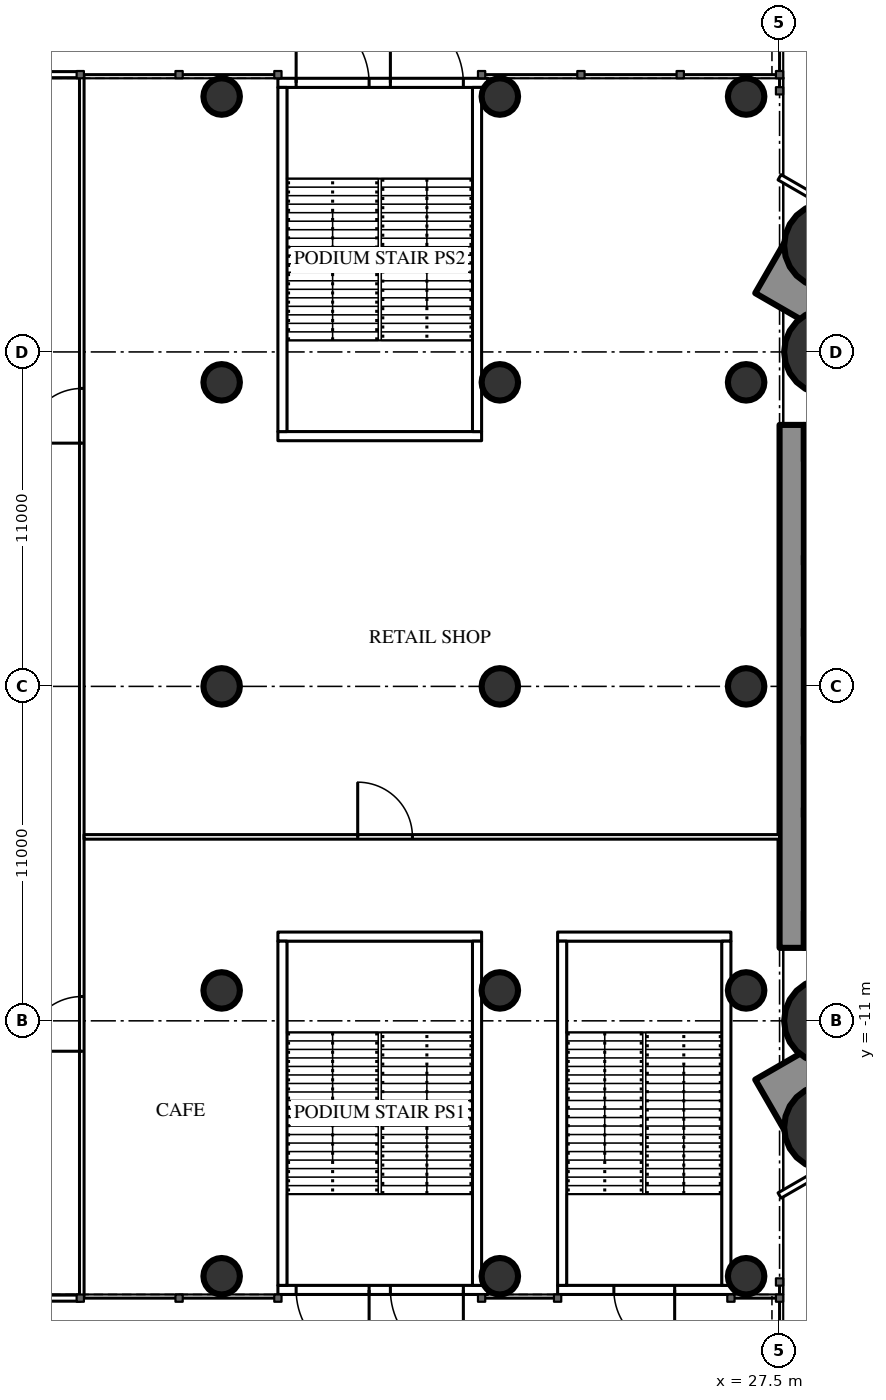
"""IFC4 building model, lengths in metres.
Left out: names, types, materials, properties, quantities, classifications, styles, units other than length and angle.
Written with IfcOpenShell. Run it as: python <this file> out.ifc"""

import sys

from ifc_helpers import new_model, si_unit, direction, frame, frame_2d, origin, origin_2d, place, context, subcontext, project, spatial, rectangle, circle, hollow_circle, extrude, element, fill, save


model = new_model("IFC4")
c1 = context("Model", 3, precision=1e-05, world=origin(), true_north=direction((0.0, 1.0)))
c2 = subcontext(c1, "Body", "Model", "MODEL_VIEW")
j1 = project(units=[si_unit("LENGTHUNIT", "METRE"), si_unit("PLANEANGLEUNIT", "RADIAN")], contexts=[c1])
p1 = place(None, origin())
s1 = spatial("IfcSite", under=j1, at=p1, CompositionType="ELEMENT")
p2 = place(p1, origin())
s2 = spatial("IfcBuilding", under=s1, at=p2, CompositionType="ELEMENT")
p3 = place(p2, origin())
s3 = spatial("IfcBuildingStorey", under=s2, at=p3, CompositionType="ELEMENT", Elevation=0.0)
for number, where, z_axis, x_axis in (
    (1, (29.05, 11.0, 0.0), (0.0, 0.0, 1.0), (1.0, 0.0, 0.0)),
    (2, (29.05, -11.0, 0.0), (0.0, 0.0, 1.0), (1.0, 0.0, 0.0)),
    (3, (29.05, -14.5, 0.0), (0.0, 0.0, 1.0), (1.0, 0.0, 0.0)),
    (4, (29.05, 14.5, 0.0), (0.0, 0.0, 1.0), (1.0, 0.0, 0.0)),
):
    element("IfcColumn", number, at=place(p3, frame(where, z_axis=z_axis, x_axis=x_axis)), inside=s3, PredefinedType="COLUMN", context=c2, shape_type="SweptSolid", body=[
        extrude(hollow_circle(Radius=1.4, WallThickness=0.12, at=origin_2d()), origin(), (0.0, 0.0, 1.0), 7.2),
    ])
p4 = place(p3, frame((27.9, -8.6, 0.0), z_axis=(0.0, 0.0, 1.0), x_axis=(0.0, 1.0, 0.0)))
e5 = element("IfcWall", 5, at=p4, inside=s3, PredefinedType="SHEAR", context=c2, shape_type="SweptSolid", body=[
    extrude(rectangle(XDim=17.2, YDim=0.8, at=frame_2d((8.6, 0.0))), origin(), (0.0, 0.0, 1.0), 7.2),
])
p5 = place(p3, frame((28.3, -8.0, 0.0), z_axis=(0.0, 0.0, 1.0), x_axis=(1.0, 0.0, 0.0)))
e6 = element("IfcWall", 6, at=p5, inside=s3, PredefinedType="SHEAR", context=c2, shape_type="SweptSolid", body=[
    extrude(rectangle(XDim=8.4, YDim=1.2, at=frame_2d((4.2, 0.0))), origin(), (0.0, 0.0, 1.0), 7.2),
])
p6 = place(p5, frame((0.25, 0.0, 0.0)))
e7 = element("IfcOpeningElement", 7, at=p6, cuts=e6, PredefinedType="OPENING", context=c2, shape_type="SweptSolid", body=[
    extrude(rectangle(XDim=1.0, YDim=2.2, at=frame_2d((0.5, 1.1))), frame((0.0, 0.61, 0.0), z_axis=(0.0, -1.0, 0.0), x_axis=(1.0, 0.0, 0.0)), (0.0, 0.0, 1.0), 1.22),
])
p7 = place(p3, frame((28.3, 8.0, 0.0), z_axis=(0.0, 0.0, 1.0), x_axis=(1.0, 0.0, 0.0)))
e8 = element("IfcWall", 8, at=p7, inside=s3, PredefinedType="SHEAR", context=c2, shape_type="SweptSolid", body=[
    extrude(rectangle(XDim=8.4, YDim=1.2, at=frame_2d((4.2, 0.0))), origin(), (0.0, 0.0, 1.0), 7.2),
])
p8 = place(p7, frame((0.25, 0.0, 0.0)))
e9 = element("IfcOpeningElement", 9, at=p8, cuts=e8, PredefinedType="OPENING", context=c2, shape_type="SweptSolid", body=[
    extrude(rectangle(XDim=1.0, YDim=2.2, at=frame_2d((0.5, 1.1))), frame((0.0, 0.61, 0.0), z_axis=(0.0, -1.0, 0.0), x_axis=(1.0, 0.0, 0.0)), (0.0, 0.0, 1.0), 1.22),
])
for number, where, z_axis, x_axis in (
    (10, (28.3, -4.15, 0.0), (0.0, 0.0, 1.0), (1.0, 0.0, 0.0)),
    (11, (28.3, 4.15, 0.0), (0.0, 0.0, 1.0), (1.0, 0.0, 0.0)),
):
    element("IfcWall", number, at=place(p3, frame(where, z_axis=z_axis, x_axis=x_axis)), inside=s3, PredefinedType="SHEAR", context=c2, shape_type="SweptSolid", body=[
        extrude(rectangle(XDim=8.4, YDim=0.3, at=frame_2d((4.2, 0.0))), origin(), (0.0, 0.0, 1.0), 7.2),
    ])
for number, where, z_axis, x_axis in (
    (12, (28.3, -1.775, 0.0), (0.0, 0.0, 1.0), (1.0, 0.0, 0.0)),
    (13, (28.3, 1.775, 0.0), (0.0, 0.0, 1.0), (1.0, 0.0, 0.0)),
):
    element("IfcWall", number, at=place(p3, frame(where, z_axis=z_axis, x_axis=x_axis)), inside=s3, PredefinedType="SHEAR", context=c2, shape_type="SweptSolid", body=[
        extrude(rectangle(XDim=2.9, YDim=0.25, at=frame_2d((1.45, 0.0))), origin(), (0.0, 0.0, 1.0), 7.2),
    ])
p9 = place(p3, frame((27.2, -13.8, 0.0), z_axis=(0.0, 0.0, 1.0), x_axis=(0.866027159892, 0.499996958321, 0.0)))
e14 = element("IfcWall", 14, at=p9, inside=s3, PredefinedType="SHEAR", context=c2, shape_type="SweptSolid", body=[
    extrude(rectangle(XDim=27.947, YDim=2.0, at=frame_2d((13.973, 0.0))), origin(), (0.0, 0.0, 1.0), 7.2),
])
p10 = place(p9, frame((4.6, 0.0, 0.0)))
e15 = element("IfcOpeningElement", 15, at=p10, cuts=e14, PredefinedType="OPENING", context=c2, shape_type="SweptSolid", body=[
    extrude(rectangle(XDim=1.0, YDim=2.2, at=frame_2d((0.5, 1.1))), frame((0.0, 1.01, 0.0), z_axis=(0.0, -1.0, 0.0), x_axis=(1.0, 0.0, 0.0)), (0.0, 0.0, 1.0), 2.02),
])
p11 = place(p9, frame((13.395, 0.0, 0.0)))
e16 = element("IfcOpeningElement", 16, at=p11, cuts=e14, PredefinedType="OPENING", context=c2, shape_type="SweptSolid", body=[
    extrude(rectangle(XDim=1.8, YDim=2.2, at=frame_2d((0.9, 1.1))), frame((0.0, 1.01, 0.0), z_axis=(0.0, -1.0, 0.0), x_axis=(1.0, 0.0, 0.0)), (0.0, 0.0, 1.0), 2.02),
])
p12 = place(p3, frame((27.2, 13.8, 0.0), z_axis=(0.0, 0.0, 1.0), x_axis=(0.866024545924, -0.500001485854, 0.0)))
e17 = element("IfcWall", 17, at=p12, inside=s3, PredefinedType="SHEAR", context=c2, shape_type="SweptSolid", body=[
    extrude(rectangle(XDim=26.534, YDim=2.0, at=frame_2d((13.267, 0.0))), origin(), (0.0, 0.0, 1.0), 7.2),
])
p13 = place(p12, frame((4.6, 0.0, 0.0)))
e18 = element("IfcOpeningElement", 18, at=p13, cuts=e17, PredefinedType="OPENING", context=c2, shape_type="SweptSolid", body=[
    extrude(rectangle(XDim=1.0, YDim=2.2, at=frame_2d((0.5, 1.1))), frame((0.0, 1.01, 0.0), z_axis=(0.0, -1.0, 0.0), x_axis=(1.0, 0.0, 0.0)), (0.0, 0.0, 1.0), 2.02),
])
p14 = place(p12, frame((13.395, 0.0, 0.0)))
e19 = element("IfcOpeningElement", 19, at=p14, cuts=e17, PredefinedType="OPENING", context=c2, shape_type="SweptSolid", body=[
    extrude(rectangle(XDim=1.8, YDim=2.2, at=frame_2d((0.9, 1.1))), frame((0.0, 1.01, 0.0), z_axis=(0.0, -1.0, 0.0), x_axis=(1.0, 0.0, 0.0)), (0.0, 0.0, 1.0), 2.02),
])
for number, where, z_axis, x_axis in (
    (20, (9.15, -19.4, 0.0), (0.0, 0.0, 1.0), (1.0, 0.0, 0.0)),
    (21, (9.15, -10.0, 0.0), (0.0, 0.0, 1.0), (1.0, 0.0, 0.0)),
    (22, (9.15, 0.0, 0.0), (0.0, 0.0, 1.0), (1.0, 0.0, 0.0)),
    (23, (9.15, 10.0, 0.0), (0.0, 0.0, 1.0), (1.0, 0.0, 0.0)),
    (24, (9.15, 19.4, 0.0), (0.0, 0.0, 1.0), (1.0, 0.0, 0.0)),
    (25, (18.3, -19.4, 0.0), (0.0, 0.0, 1.0), (1.0, 0.0, 0.0)),
    (26, (18.3, -10.0, 0.0), (0.0, 0.0, 1.0), (1.0, 0.0, 0.0)),
    (27, (18.3, 0.0, 0.0), (0.0, 0.0, 1.0), (1.0, 0.0, 0.0)),
    (28, (18.3, 10.0, 0.0), (0.0, 0.0, 1.0), (1.0, 0.0, 0.0)),
    (29, (18.3, 19.4, 0.0), (0.0, 0.0, 1.0), (1.0, 0.0, 0.0)),
    (30, (26.4, -19.4, 0.0), (0.0, 0.0, 1.0), (1.0, 0.0, 0.0)),
    (31, (26.4, -10.0, 0.0), (0.0, 0.0, 1.0), (1.0, 0.0, 0.0)),
    (32, (26.4, 0.0, 0.0), (0.0, 0.0, 1.0), (1.0, 0.0, 0.0)),
    (33, (26.4, 10.0, 0.0), (0.0, 0.0, 1.0), (1.0, 0.0, 0.0)),
    (34, (26.4, 19.4, 0.0), (0.0, 0.0, 1.0), (1.0, 0.0, 0.0)),
):
    element("IfcColumn", number, at=place(p3, frame(where, z_axis=z_axis, x_axis=x_axis)), inside=s3, PredefinedType="COLUMN", context=c2, shape_type="SweptSolid", body=[
        extrude(circle(Radius=0.6, at=origin_2d()), origin(), (0.0, 0.0, 1.0), 7.2),
    ])
p15 = place(p3, frame((4.5, -20.12, 0.0), z_axis=(0.0, 0.0, 1.0), x_axis=(-1.0, 0.0, 0.0)))
e35 = element("IfcWall", 35, at=p15, inside=s3, PredefinedType="STANDARD", context=c2, shape_type="SweptSolid", body=[
    extrude(rectangle(XDim=9.0, YDim=0.2, at=frame_2d((4.5, 0.0))), origin(), (0.0, 0.0, 1.0), 6.85),
])
p16 = place(p15, frame((6.0, 0.0, 0.0)))
e36 = element("IfcOpeningElement", 36, at=p16, cuts=e35, PredefinedType="OPENING", context=c2, shape_type="SweptSolid", body=[
    extrude(rectangle(XDim=1.8, YDim=2.4, at=frame_2d((0.9, 1.2))), frame((0.0, 0.11, 0.0), z_axis=(0.0, -1.0, 0.0), x_axis=(1.0, 0.0, 0.0)), (0.0, 0.0, 1.0), 0.22),
])
p17 = place(p15, frame((1.2, 0.0, 0.0)))
e37 = element("IfcOpeningElement", 37, at=p17, cuts=e35, PredefinedType="OPENING", context=c2, shape_type="SweptSolid", body=[
    extrude(rectangle(XDim=1.8, YDim=2.4, at=frame_2d((0.9, 1.2))), frame((0.0, 0.11, 0.0), z_axis=(0.0, -1.0, 0.0), x_axis=(1.0, 0.0, 0.0)), (0.0, 0.0, 1.0), 0.22),
])
p18 = place(p3, frame((-4.5, 20.12, 0.0), z_axis=(0.0, 0.0, 1.0), x_axis=(1.0, 0.0, 0.0)))
e38 = element("IfcWall", 38, at=p18, inside=s3, PredefinedType="STANDARD", context=c2, shape_type="SweptSolid", body=[
    extrude(rectangle(XDim=9.0, YDim=0.2, at=frame_2d((4.5, 0.0))), origin(), (0.0, 0.0, 1.0), 6.85),
])
p19 = place(p18, frame((6.0, 0.0, 0.0)))
e39 = element("IfcOpeningElement", 39, at=p19, cuts=e38, PredefinedType="OPENING", context=c2, shape_type="SweptSolid", body=[
    extrude(rectangle(XDim=1.8, YDim=2.4, at=frame_2d((0.9, 1.2))), frame((0.0, 0.11, 0.0), z_axis=(0.0, -1.0, 0.0), x_axis=(1.0, 0.0, 0.0)), (0.0, 0.0, 1.0), 0.22),
])
p20 = place(p18, frame((1.2, 0.0, 0.0)))
e40 = element("IfcOpeningElement", 40, at=p20, cuts=e38, PredefinedType="OPENING", context=c2, shape_type="SweptSolid", body=[
    extrude(rectangle(XDim=1.8, YDim=2.4, at=frame_2d((0.9, 1.2))), frame((0.0, 0.11, 0.0), z_axis=(0.0, -1.0, 0.0), x_axis=(1.0, 0.0, 0.0)), (0.0, 0.0, 1.0), 0.22),
])
p21 = place(p3, frame((27.5, -16.744, 0.0), z_axis=(0.0, 0.0, 1.0), x_axis=(0.866034395887, 0.499984424899, 0.0)))
e41 = element("IfcWall", 41, at=p21, inside=s3, PredefinedType="PARTITIONING", context=c2, shape_type="SweptSolid", body=[
    extrude(rectangle(XDim=3.469, YDim=0.2, at=frame_2d((1.734, 0.0))), origin(), (0.0, 0.0, 1.0), 6.85),
])
p22 = place(p3, frame((27.5, 16.744, 0.0), z_axis=(0.0, 0.0, 1.0), x_axis=(0.866035319247, -0.499982825521, 0.0)))
e42 = element("IfcWall", 42, at=p22, inside=s3, PredefinedType="PARTITIONING", context=c2, shape_type="SweptSolid", body=[
    extrude(rectangle(XDim=6.169, YDim=0.2, at=frame_2d((3.084, 0.0))), origin(), (0.0, 0.0, 1.0), 6.85),
])
p23 = place(p3, frame((4.55, -20.06, 0.0), z_axis=(0.0, 0.0, 1.0), x_axis=(0.0, 1.0, 0.0)))
e43 = element("IfcWall", 43, at=p23, inside=s3, PredefinedType="PARTITIONING", context=c2, shape_type="SweptSolid", body=[
    extrude(rectangle(XDim=40.12, YDim=0.15, at=frame_2d((20.06, 0.0))), origin(), (0.0, 0.0, 1.0), 5.85),
])
p24 = place(p23, frame((8.06, 0.0, 0.0)))
e44 = element("IfcOpeningElement", 44, at=p24, cuts=e43, PredefinedType="OPENING", context=c2, shape_type="SweptSolid", body=[
    extrude(rectangle(XDim=1.8, YDim=2.2, at=frame_2d((0.9, 1.1))), frame((0.0, 0.085, 0.0), z_axis=(0.0, -1.0, 0.0), x_axis=(1.0, 0.0, 0.0)), (0.0, 0.0, 1.0), 0.17),
])
p25 = place(p23, frame((28.06, 0.0, 0.0)))
e45 = element("IfcOpeningElement", 45, at=p25, cuts=e43, PredefinedType="OPENING", context=c2, shape_type="SweptSolid", body=[
    extrude(rectangle(XDim=1.8, YDim=2.2, at=frame_2d((0.9, 1.1))), frame((0.0, 0.085, 0.0), z_axis=(0.0, -1.0, 0.0), x_axis=(1.0, 0.0, 0.0)), (0.0, 0.0, 1.0), 0.17),
])
p26 = place(p3, frame((4.625, -4.95, 0.0), z_axis=(0.0, 0.0, 1.0), x_axis=(1.0, 0.0, 0.0)))
e46 = element("IfcWall", 46, at=p26, inside=s3, PredefinedType="PARTITIONING", context=c2, shape_type="SweptSolid", body=[
    extrude(rectangle(XDim=22.875, YDim=0.15, at=frame_2d((11.438, 0.0))), origin(), (0.0, 0.0, 1.0), 5.85),
])
p27 = place(p26, frame((9.0, 0.0, 0.0)))
e47 = element("IfcOpeningElement", 47, at=p27, cuts=e46, PredefinedType="OPENING", context=c2, shape_type="SweptSolid", body=[
    extrude(rectangle(XDim=1.8, YDim=2.2, at=frame_2d((0.9, 1.1))), frame((0.0, 0.085, 0.0), z_axis=(0.0, -1.0, 0.0), x_axis=(1.0, 0.0, 0.0)), (0.0, 0.0, 1.0), 0.17),
])
p28 = place(p3, frame((17.903, -19.85, 0.0), z_axis=(0.0, 0.0, 1.0), x_axis=(-1.0, 0.0, 0.0)))
e48 = element("IfcWall", 48, at=p28, inside=s3, PredefinedType="SOLIDWALL", context=c2, shape_type="SweptSolid", body=[
    extrude(rectangle(XDim=6.903, YDim=0.3, at=frame_2d((3.452, 0.0))), origin(), (0.0, 0.0, 1.0), 5.95),
])
p29 = place(p28, frame((3.903, 0.0, 0.0)))
e49 = element("IfcOpeningElement", 49, at=p29, cuts=e48, PredefinedType="OPENING", context=c2, shape_type="SweptSolid", body=[
    extrude(rectangle(XDim=2.4, YDim=2.2, at=frame_2d((1.2, 1.1))), frame((0.0, 0.16, 0.0), z_axis=(0.0, -1.0, 0.0), x_axis=(1.0, 0.0, 0.0)), (0.0, 0.0, 1.0), 0.32),
])
p30 = place(p28, frame((0.803, 0.0, 0.0)))
e50 = element("IfcOpeningElement", 50, at=p30, cuts=e48, PredefinedType="OPENING", context=c2, shape_type="SweptSolid", body=[
    extrude(rectangle(XDim=2.4, YDim=2.2, at=frame_2d((1.2, 1.1))), frame((0.0, 0.16, 0.0), z_axis=(0.0, -1.0, 0.0), x_axis=(1.0, 0.0, 0.0)), (0.0, 0.0, 1.0), 0.32),
])
p31 = place(p3, frame((11.0, -8.23, 0.0), z_axis=(0.0, 0.0, 1.0), x_axis=(1.0, 0.0, 0.0)))
e51 = element("IfcWall", 51, at=p31, inside=s3, PredefinedType="SOLIDWALL", context=c2, shape_type="SweptSolid", body=[
    extrude(rectangle(XDim=6.7, YDim=0.3, at=frame_2d((3.35, 0.0))), origin(), (0.0, 0.0, 1.0), 6.85),
])
for number, where, z_axis, x_axis in (
    (52, (11.15, -8.38, 0.0), (0.0, 0.0, 1.0), (0.0, -1.0, 0.0)),
    (53, (17.55, -8.38, 0.0), (0.0, 0.0, 1.0), (0.0, -1.0, 0.0)),
):
    element("IfcWall", number, at=place(p3, frame(where, z_axis=z_axis, x_axis=x_axis)), inside=s3, PredefinedType="SOLIDWALL", context=c2, shape_type="SweptSolid", body=[
        extrude(rectangle(XDim=11.32, YDim=0.3, at=frame_2d((5.66, 0.0))), origin(), (0.0, 0.0, 1.0), 6.85),
    ])
p32 = place(p3, frame((11.0, 19.85, 0.0), z_axis=(0.0, 0.0, 1.0), x_axis=(1.0, 0.0, 0.0)))
e54 = element("IfcWall", 54, at=p32, inside=s3, PredefinedType="SOLIDWALL", context=c2, shape_type="SweptSolid", body=[
    extrude(rectangle(XDim=6.903, YDim=0.3, at=frame_2d((3.452, 0.0))), origin(), (0.0, 0.0, 1.0), 5.95),
])
p33 = place(p32, frame((0.6, 0.0, 0.0)))
e55 = element("IfcOpeningElement", 55, at=p33, cuts=e54, PredefinedType="OPENING", context=c2, shape_type="SweptSolid", body=[
    extrude(rectangle(XDim=2.4, YDim=2.2, at=frame_2d((1.2, 1.1))), frame((0.0, 0.16, 0.0), z_axis=(0.0, -1.0, 0.0), x_axis=(1.0, 0.0, 0.0)), (0.0, 0.0, 1.0), 0.32),
])
p34 = place(p32, frame((3.7, 0.0, 0.0)))
e56 = element("IfcOpeningElement", 56, at=p34, cuts=e54, PredefinedType="OPENING", context=c2, shape_type="SweptSolid", body=[
    extrude(rectangle(XDim=2.4, YDim=2.2, at=frame_2d((1.2, 1.1))), frame((0.0, 0.16, 0.0), z_axis=(0.0, -1.0, 0.0), x_axis=(1.0, 0.0, 0.0)), (0.0, 0.0, 1.0), 0.32),
])
p35 = place(p3, frame((11.0, 8.23, 0.0), z_axis=(0.0, 0.0, 1.0), x_axis=(1.0, 0.0, 0.0)))
e57 = element("IfcWall", 57, at=p35, inside=s3, PredefinedType="SOLIDWALL", context=c2, shape_type="SweptSolid", body=[
    extrude(rectangle(XDim=6.7, YDim=0.3, at=frame_2d((3.35, 0.0))), origin(), (0.0, 0.0, 1.0), 6.85),
])
for number, where, z_axis, x_axis in (
    (58, (11.15, 8.38, 0.0), (0.0, 0.0, 1.0), (0.0, 1.0, 0.0)),
    (59, (17.55, 8.38, 0.0), (0.0, 0.0, 1.0), (0.0, 1.0, 0.0)),
):
    element("IfcWall", number, at=place(p3, frame(where, z_axis=z_axis, x_axis=x_axis)), inside=s3, PredefinedType="SOLIDWALL", context=c2, shape_type="SweptSolid", body=[
        extrude(rectangle(XDim=11.32, YDim=0.3, at=frame_2d((5.66, 0.0))), origin(), (0.0, 0.0, 1.0), 6.85),
    ])
p36 = place(p3, frame((26.003, -19.85, 0.0), z_axis=(0.0, 0.0, 1.0), x_axis=(-1.0, 0.0, 0.0)))
e60 = element("IfcWall", 60, at=p36, inside=s3, PredefinedType="SOLIDWALL", context=c2, shape_type="SweptSolid", body=[
    extrude(rectangle(XDim=5.803, YDim=0.3, at=frame_2d((2.902, 0.0))), origin(), (0.0, 0.0, 1.0), 5.95),
])
p37 = place(p36, frame((1.953, 0.0, 0.0)))
e61 = element("IfcOpeningElement", 61, at=p37, cuts=e60, PredefinedType="OPENING", context=c2, shape_type="SweptSolid", body=[
    extrude(rectangle(XDim=2.0, YDim=2.2, at=frame_2d((1.0, 1.1))), frame((0.0, 0.16, 0.0), z_axis=(0.0, -1.0, 0.0), x_axis=(1.0, 0.0, 0.0)), (0.0, 0.0, 1.0), 0.32),
])
p38 = place(p3, frame((20.2, -8.23, 0.0), z_axis=(0.0, 0.0, 1.0), x_axis=(1.0, 0.0, 0.0)))
e62 = element("IfcWall", 62, at=p38, inside=s3, PredefinedType="SOLIDWALL", context=c2, shape_type="SweptSolid", body=[
    extrude(rectangle(XDim=5.7, YDim=0.3, at=frame_2d((2.85, 0.0))), origin(), (0.0, 0.0, 1.0), 6.85),
])
for number, where, z_axis, x_axis in (
    (63, (20.35, -8.38, 0.0), (0.0, 0.0, 1.0), (0.0, -1.0, 0.0)),
    (64, (25.75, -8.38, 0.0), (0.0, 0.0, 1.0), (0.0, -1.0, 0.0)),
):
    element("IfcWall", number, at=place(p3, frame(where, z_axis=z_axis, x_axis=x_axis)), inside=s3, PredefinedType="SOLIDWALL", context=c2, shape_type="SweptSolid", body=[
        extrude(rectangle(XDim=11.32, YDim=0.3, at=frame_2d((5.66, 0.0))), origin(), (0.0, 0.0, 1.0), 6.85),
    ])
p39 = place(p24, origin())
e65 = element("IfcDoor", 65, at=p39, inside=s3, OperationType="DOUBLE_DOOR_SINGLE_SWING", PredefinedType="DOOR", context=c2, shape_type="SweptSolid", body=[
    extrude(rectangle(XDim=1.8, YDim=2.2, at=frame_2d((0.9, 1.1))), frame((0.0, 0.025, 0.0), z_axis=(0.0, -1.0, 0.0), x_axis=(1.0, 0.0, 0.0)), (0.0, 0.0, 1.0), 0.05),
])
fill(e44, e65)
p40 = place(p25, origin())
e66 = element("IfcDoor", 66, at=p40, inside=s3, OperationType="DOUBLE_DOOR_SINGLE_SWING", PredefinedType="DOOR", context=c2, shape_type="SweptSolid", body=[
    extrude(rectangle(XDim=1.8, YDim=2.2, at=frame_2d((0.9, 1.1))), frame((0.0, 0.025, 0.0), z_axis=(0.0, -1.0, 0.0), x_axis=(1.0, 0.0, 0.0)), (0.0, 0.0, 1.0), 0.05),
])
fill(e45, e66)
p41 = place(p27, origin())
e67 = element("IfcDoor", 67, at=p41, inside=s3, OperationType="DOUBLE_DOOR_SINGLE_SWING", PredefinedType="DOOR", context=c2, shape_type="SweptSolid", body=[
    extrude(rectangle(XDim=1.8, YDim=2.2, at=frame_2d((0.9, 1.1))), frame((0.0, 0.025, 0.0), z_axis=(0.0, -1.0, 0.0), x_axis=(1.0, 0.0, 0.0)), (0.0, 0.0, 1.0), 0.05),
])
fill(e47, e67)
p42 = place(p29, origin())
e68 = element("IfcDoor", 68, at=p42, inside=s3, OperationType="DOUBLE_DOOR_SINGLE_SWING", PredefinedType="DOOR", context=c2, shape_type="SweptSolid", body=[
    extrude(rectangle(XDim=2.4, YDim=2.2, at=frame_2d((1.2, 1.1))), frame((0.0, 0.025, 0.0), z_axis=(0.0, -1.0, 0.0), x_axis=(1.0, 0.0, 0.0)), (0.0, 0.0, 1.0), 0.05),
])
fill(e49, e68)
p43 = place(p30, origin())
e69 = element("IfcDoor", 69, at=p43, inside=s3, OperationType="DOUBLE_DOOR_SINGLE_SWING", PredefinedType="DOOR", context=c2, shape_type="SweptSolid", body=[
    extrude(rectangle(XDim=2.4, YDim=2.2, at=frame_2d((1.2, 1.1))), frame((0.0, 0.025, 0.0), z_axis=(0.0, -1.0, 0.0), x_axis=(1.0, 0.0, 0.0)), (0.0, 0.0, 1.0), 0.05),
])
fill(e50, e69)
p44 = place(p33, origin())
e70 = element("IfcDoor", 70, at=p44, inside=s3, OperationType="DOUBLE_DOOR_SINGLE_SWING", PredefinedType="DOOR", context=c2, shape_type="SweptSolid", body=[
    extrude(rectangle(XDim=2.4, YDim=2.2, at=frame_2d((1.2, 1.1))), frame((0.0, 0.025, 0.0), z_axis=(0.0, -1.0, 0.0), x_axis=(1.0, 0.0, 0.0)), (0.0, 0.0, 1.0), 0.05),
])
fill(e55, e70)
p45 = place(p34, origin())
e71 = element("IfcDoor", 71, at=p45, inside=s3, OperationType="DOUBLE_DOOR_SINGLE_SWING", PredefinedType="DOOR", context=c2, shape_type="SweptSolid", body=[
    extrude(rectangle(XDim=2.4, YDim=2.2, at=frame_2d((1.2, 1.1))), frame((0.0, 0.025, 0.0), z_axis=(0.0, -1.0, 0.0), x_axis=(1.0, 0.0, 0.0)), (0.0, 0.0, 1.0), 0.05),
])
fill(e56, e71)
p46 = place(p37, origin())
e72 = element("IfcDoor", 72, at=p46, inside=s3, OperationType="DOUBLE_DOOR_SINGLE_SWING", PredefinedType="DOOR", context=c2, shape_type="SweptSolid", body=[
    extrude(rectangle(XDim=2.0, YDim=2.2, at=frame_2d((1.0, 1.1))), frame((0.0, 0.025, 0.0), z_axis=(0.0, -1.0, 0.0), x_axis=(1.0, 0.0, 0.0)), (0.0, 0.0, 1.0), 0.05),
])
fill(e61, e72)
save(model, sys.argv[1])
